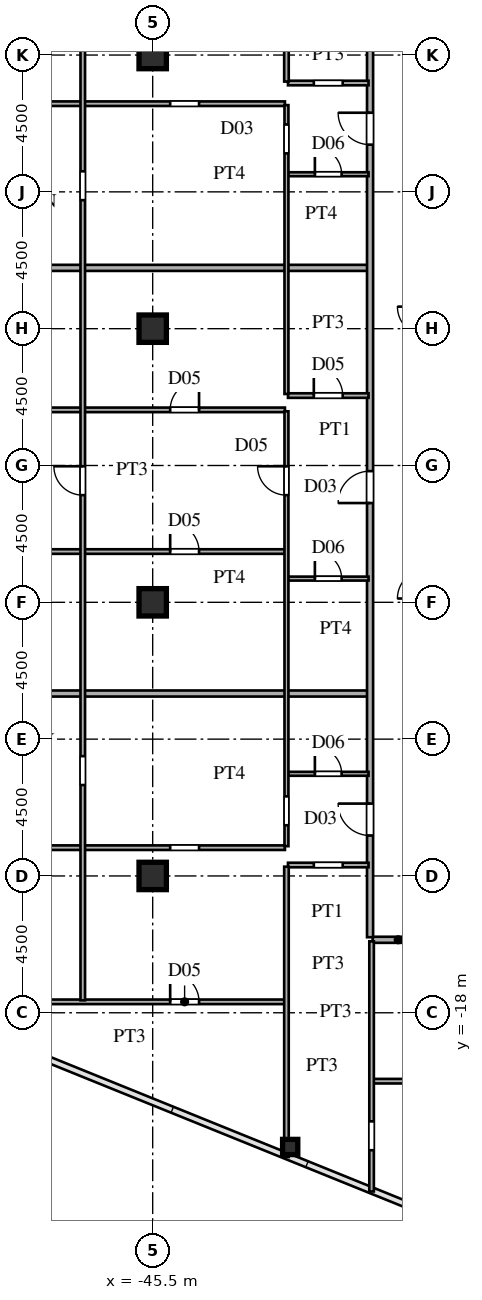
"""IFC4 building model, lengths in metres.
Left out: names, types, materials, properties, quantities, classifications, styles, units other than length and angle.
Written with IfcOpenShell. Run it as: python <this file> out.ifc"""

import sys

from ifc_helpers import new_model, si_unit, direction, frame, frame_2d, origin, origin_2d, place, context, subcontext, project, spatial, rectangle, hollow_rectangle, i_section, extrude, source, transform, mapped, element, fill, save


model = new_model("IFC4")
c1 = context("Model", 3, precision=1e-05, world=origin(), true_north=direction((0.0, 1.0)))
c2 = subcontext(c1, "Body", "Model", "MODEL_VIEW")
j1 = project(units=[si_unit("LENGTHUNIT", "METRE"), si_unit("PLANEANGLEUNIT", "RADIAN")], contexts=[c1])
p1 = place(None, origin())
s1 = spatial("IfcSite", under=j1, at=p1, CompositionType="ELEMENT")
p2 = place(p1, origin())
s2 = spatial("IfcBuilding", under=s1, at=p2, CompositionType="ELEMENT")
p3 = place(p2, frame((0.0, 0.0, 22.5)))
s3 = spatial("IfcBuildingStorey", under=s2, at=p3, CompositionType="ELEMENT", Elevation=22.5)
m1 = source(origin(), c2, "Body", "SweptSolid", [
    extrude(i_section(OverallWidth=0.9, OverallDepth=0.9, WebThickness=0.036, FlangeThickness=0.055, at=origin_2d()), origin(), (0.0, 0.0, 1.0), 3.6),
])
for number, where, z_axis, x_axis in (
    (1, (-45.5, -13.5, 0.0), (0.0, 0.0, 1.0), (1.0, 0.0, 0.0)),
    (2, (-45.5, -4.5, 0.0), (0.0, 0.0, 1.0), (1.0, 0.0, 0.0)),
    (3, (-45.5, 4.5, 0.0), (0.0, 0.0, 1.0), (1.0, 0.0, 0.0)),
    (4, (-45.5, 13.5, 0.0), (0.0, 0.0, 1.0), (1.0, 0.0, 0.0)),
):
    element("IfcColumn", number, at=place(p3, frame(where, z_axis=z_axis, x_axis=x_axis)), inside=s3, PredefinedType="COLUMN", context=c2, shape_type="MappedRepresentation", body=[
        mapped(m1, transform((0.0, 0.0, 0.0), scale=1.0)),
    ])
m2 = source(origin(), c2, "Body", "SweptSolid", [
    extrude(hollow_rectangle(XDim=0.5, YDim=0.5, WallThickness=0.02, at=origin_2d()), origin(), (0.0, 0.0, 1.0), 3.6),
])
p4 = place(p3, frame((-40.977, -22.414, 0.0), z_axis=(0.0, 0.0, 1.0), x_axis=(1.0, 0.0, 0.0)))
e5 = element("IfcColumn", 5, at=p4, inside=s3, PredefinedType="COLUMN", context=c2, shape_type="MappedRepresentation", body=[
    mapped(m2, transform((0.0, 0.0, 0.0), scale=1.0)),
])
p5 = place(p3, frame((-38.25, -20.25, 0.0), z_axis=(0.0, 0.0, 1.0), x_axis=(1.0, 0.0, 0.0)))
e6 = element("IfcWall", 6, at=p5, inside=s3, PredefinedType="PARTITIONING", context=c2, shape_type="SweptSolid", body=[
    extrude(rectangle(XDim=10.785, YDim=0.15, at=frame_2d((5.393, 0.0))), origin(), (0.0, 0.0, 1.0), 3.38),
])
p6 = place(p5, frame((4.875, 0.0, 0.0)))
e7 = element("IfcOpeningElement", 7, at=p6, cuts=e6, PredefinedType="OPENING", context=c2, shape_type="SweptSolid", body=[
    extrude(rectangle(XDim=0.95, YDim=2.15, at=frame_2d((0.475, 1.075))), frame((0.0, 0.085, 0.0), z_axis=(0.0, -1.0, 0.0), x_axis=(1.0, 0.0, 0.0)), (0.0, 0.0, 1.0), 0.17),
])
p7 = place(p3, frame((-53.66, -17.64, 0.0), z_axis=(0.0, 0.0, 1.0), x_axis=(1.0, 0.0, 0.0)))
e8 = element("IfcWall", 8, at=p7, inside=s3, PredefinedType="PARTITIONING", context=c2, shape_type="SweptSolid", body=[
    extrude(rectangle(XDim=12.51, YDim=0.15, at=frame_2d((6.255, 0.0))), origin(), (0.0, 0.0, 1.0), 3.38),
])
p8 = place(p7, frame((8.735, 0.0, 0.0)))
e9 = element("IfcOpeningElement", 9, at=p8, cuts=e8, PredefinedType="OPENING", context=c2, shape_type="SweptSolid", body=[
    extrude(rectangle(XDim=0.95, YDim=2.15, at=frame_2d((0.475, 1.075))), frame((0.0, 0.085, 0.0), z_axis=(0.0, -1.0, 0.0), x_axis=(1.0, 0.0, 0.0)), (0.0, 0.0, 1.0), 0.17),
])
p9 = place(p7, frame((2.659, 0.0, 0.0)))
e10 = element("IfcOpeningElement", 10, at=p9, cuts=e8, PredefinedType="OPENING", context=c2, shape_type="SweptSolid", body=[
    extrude(rectangle(XDim=0.95, YDim=2.15, at=frame_2d((0.475, 1.075))), frame((0.0, 0.085, 0.0), z_axis=(0.0, -1.0, 0.0), x_axis=(1.0, 0.0, 0.0)), (0.0, 0.0, 1.0), 0.17),
])
p10 = place(p3, frame((-38.265, -15.6, 0.0), z_axis=(0.0, 0.0, 1.0), x_axis=(1.0, 0.0, 0.0)))
e11 = element("IfcWall", 11, at=p10, inside=s3, PredefinedType="PARTITIONING", context=c2, shape_type="SweptSolid", body=[
    extrude(rectangle(XDim=1.68, YDim=0.2, at=frame_2d((0.84, 0.0))), origin(), (0.0, 0.0, 1.0), 3.38),
])
p11 = place(p3, frame((-41.05, -13.14, 0.0), z_axis=(0.0, 0.0, 1.0), x_axis=(1.0, 0.0, 0.0)))
e12 = element("IfcWall", 12, at=p11, inside=s3, PredefinedType="PARTITIONING", context=c2, shape_type="SweptSolid", body=[
    extrude(rectangle(XDim=2.65, YDim=0.15, at=frame_2d((1.325, 0.0))), origin(), (0.0, 0.0, 1.0), 3.38),
])
p12 = place(p11, frame((0.85, 0.0, 0.0)))
e13 = element("IfcOpeningElement", 13, at=p12, cuts=e12, PredefinedType="OPENING", context=c2, shape_type="SweptSolid", body=[
    extrude(rectangle(XDim=0.95, YDim=2.15, at=frame_2d((0.475, 1.075))), frame((0.0, 0.085, 0.0), z_axis=(0.0, -1.0, 0.0), x_axis=(1.0, 0.0, 0.0)), (0.0, 0.0, 1.0), 0.17),
])
p13 = place(p3, frame((-66.186, -12.57, 0.0), z_axis=(0.0, 0.0, 1.0), x_axis=(1.0, 0.0, 0.0)))
e14 = element("IfcWall", 14, at=p13, inside=s3, PredefinedType="PARTITIONING", context=c2, shape_type="SweptSolid", body=[
    extrude(rectangle(XDim=25.036, YDim=0.15, at=frame_2d((12.518, 0.0))), origin(), (0.0, 0.0, 1.0), 3.38),
])
p14 = place(p13, frame((21.261, 0.0, 0.0)))
e15 = element("IfcOpeningElement", 15, at=p14, cuts=e14, PredefinedType="OPENING", context=c2, shape_type="SweptSolid", body=[
    extrude(rectangle(XDim=0.95, YDim=2.15, at=frame_2d((0.475, 1.075))), frame((0.0, 0.085, 0.0), z_axis=(0.0, -1.0, 0.0), x_axis=(1.0, 0.0, 0.0)), (0.0, 0.0, 1.0), 0.17),
])
p15 = place(p13, frame((8.361, 0.0, 0.0)))
e16 = element("IfcOpeningElement", 16, at=p15, cuts=e14, PredefinedType="OPENING", context=c2, shape_type="SweptSolid", body=[
    extrude(rectangle(XDim=0.95, YDim=2.15, at=frame_2d((0.475, 1.075))), frame((0.0, 0.085, 0.0), z_axis=(0.0, -1.0, 0.0), x_axis=(1.0, 0.0, 0.0)), (0.0, 0.0, 1.0), 0.17),
])
p16 = place(p3, frame((-41.05, -10.14, 0.0), z_axis=(0.0, 0.0, 1.0), x_axis=(1.0, 0.0, 0.0)))
e17 = element("IfcWall", 17, at=p16, inside=s3, PredefinedType="PARTITIONING", context=c2, shape_type="SweptSolid", body=[
    extrude(rectangle(XDim=2.65, YDim=0.13, at=frame_2d((1.325, 0.0))), origin(), (0.0, 0.0, 1.0), 3.38),
])
p17 = place(p16, frame((0.885, 0.0, 0.0)))
e18 = element("IfcOpeningElement", 18, at=p17, cuts=e17, PredefinedType="OPENING", context=c2, shape_type="SweptSolid", body=[
    extrude(rectangle(XDim=0.88, YDim=2.1, at=frame_2d((0.44, 1.05))), frame((0.0, 0.075, 0.0), z_axis=(0.0, -1.0, 0.0), x_axis=(1.0, 0.0, 0.0)), (0.0, 0.0, 1.0), 0.15),
])
p18 = place(p3, frame((-72.505, -7.5, 0.0), z_axis=(0.0, 0.0, 1.0), x_axis=(1.0, 0.0, 0.0)))
e19 = element("IfcWall", 19, at=p18, inside=s3, PredefinedType="PARTITIONING", context=c2, shape_type="SweptSolid", body=[
    extrude(rectangle(XDim=34.075, YDim=0.2, at=frame_2d((17.038, 0.0))), origin(), (0.0, 0.0, 1.0), 3.38),
])
p19 = place(p3, frame((-41.05, -3.72, 0.0), z_axis=(0.0, 0.0, 1.0), x_axis=(1.0, 0.0, 0.0)))
e20 = element("IfcWall", 20, at=p19, inside=s3, PredefinedType="PARTITIONING", context=c2, shape_type="SweptSolid", body=[
    extrude(rectangle(XDim=2.65, YDim=0.13, at=frame_2d((1.325, 0.0))), origin(), (0.0, 0.0, 1.0), 3.38),
])
p20 = place(p19, frame((0.885, 0.0, 0.0)))
e21 = element("IfcOpeningElement", 21, at=p20, cuts=e20, PredefinedType="OPENING", context=c2, shape_type="SweptSolid", body=[
    extrude(rectangle(XDim=0.88, YDim=2.1, at=frame_2d((0.44, 1.05))), frame((0.0, 0.075, 0.0), z_axis=(0.0, -1.0, 0.0), x_axis=(1.0, 0.0, 0.0)), (0.0, 0.0, 1.0), 0.15),
])
p21 = place(p3, frame((-72.535, -2.83, 0.0), z_axis=(0.0, 0.0, 1.0), x_axis=(1.0, 0.0, 0.0)))
e22 = element("IfcWall", 22, at=p21, inside=s3, PredefinedType="PARTITIONING", context=c2, shape_type="SweptSolid", body=[
    extrude(rectangle(XDim=31.385, YDim=0.15, at=frame_2d((15.692, 0.0))), origin(), (0.0, 0.0, 1.0), 3.38),
])
p22 = place(p21, frame((27.61, 0.0, 0.0)))
e23 = element("IfcOpeningElement", 23, at=p22, cuts=e22, PredefinedType="OPENING", context=c2, shape_type="SweptSolid", body=[
    extrude(rectangle(XDim=0.95, YDim=2.15, at=frame_2d((0.475, 1.075))), frame((0.0, 0.085, 0.0), z_axis=(0.0, -1.0, 0.0), x_axis=(1.0, 0.0, 0.0)), (0.0, 0.0, 1.0), 0.17),
])
p23 = place(p21, frame((14.71, 0.0, 0.0)))
e24 = element("IfcOpeningElement", 24, at=p23, cuts=e22, PredefinedType="OPENING", context=c2, shape_type="SweptSolid", body=[
    extrude(rectangle(XDim=0.95, YDim=2.15, at=frame_2d((0.475, 1.075))), frame((0.0, 0.085, 0.0), z_axis=(0.0, -1.0, 0.0), x_axis=(1.0, 0.0, 0.0)), (0.0, 0.0, 1.0), 0.17),
])
p24 = place(p3, frame((-72.535, 1.83, 0.0), z_axis=(0.0, 0.0, 1.0), x_axis=(1.0, 0.0, 0.0)))
e25 = element("IfcWall", 25, at=p24, inside=s3, PredefinedType="PARTITIONING", context=c2, shape_type="SweptSolid", body=[
    extrude(rectangle(XDim=31.385, YDim=0.15, at=frame_2d((15.692, 0.0))), origin(), (0.0, 0.0, 1.0), 3.38),
])
p25 = place(p24, frame((27.61, 0.0, 0.0)))
e26 = element("IfcOpeningElement", 26, at=p25, cuts=e25, PredefinedType="OPENING", context=c2, shape_type="SweptSolid", body=[
    extrude(rectangle(XDim=0.95, YDim=2.15, at=frame_2d((0.475, 1.075))), frame((0.0, 0.085, 0.0), z_axis=(0.0, -1.0, 0.0), x_axis=(1.0, 0.0, 0.0)), (0.0, 0.0, 1.0), 0.17),
])
p26 = place(p24, frame((14.71, 0.0, 0.0)))
e27 = element("IfcOpeningElement", 27, at=p26, cuts=e25, PredefinedType="OPENING", context=c2, shape_type="SweptSolid", body=[
    extrude(rectangle(XDim=0.95, YDim=2.15, at=frame_2d((0.475, 1.075))), frame((0.0, 0.085, 0.0), z_axis=(0.0, -1.0, 0.0), x_axis=(1.0, 0.0, 0.0)), (0.0, 0.0, 1.0), 0.17),
])
p27 = place(p3, frame((-41.05, 2.3, 0.0), z_axis=(0.0, 0.0, 1.0), x_axis=(1.0, 0.0, 0.0)))
e28 = element("IfcWall", 28, at=p27, inside=s3, PredefinedType="PARTITIONING", context=c2, shape_type="SweptSolid", body=[
    extrude(rectangle(XDim=2.65, YDim=0.15, at=frame_2d((1.325, 0.0))), origin(), (0.0, 0.0, 1.0), 3.38),
])
p28 = place(p27, frame((0.85, 0.0, 0.0)))
e29 = element("IfcOpeningElement", 29, at=p28, cuts=e28, PredefinedType="OPENING", context=c2, shape_type="SweptSolid", body=[
    extrude(rectangle(XDim=0.95, YDim=2.15, at=frame_2d((0.475, 1.075))), frame((0.0, 0.085, 0.0), z_axis=(0.0, -1.0, 0.0), x_axis=(1.0, 0.0, 0.0)), (0.0, 0.0, 1.0), 0.17),
])
p29 = place(p3, frame((-72.505, 6.5, 0.0), z_axis=(0.0, 0.0, 1.0), x_axis=(1.0, 0.0, 0.0)))
e30 = element("IfcWall", 30, at=p29, inside=s3, PredefinedType="PARTITIONING", context=c2, shape_type="SweptSolid", body=[
    extrude(rectangle(XDim=34.075, YDim=0.2, at=frame_2d((17.038, 0.0))), origin(), (0.0, 0.0, 1.0), 3.38),
])
p30 = place(p3, frame((-41.05, 9.58, 0.0), z_axis=(0.0, 0.0, 1.0), x_axis=(1.0, 0.0, 0.0)))
e31 = element("IfcWall", 31, at=p30, inside=s3, PredefinedType="PARTITIONING", context=c2, shape_type="SweptSolid", body=[
    extrude(rectangle(XDim=2.65, YDim=0.13, at=frame_2d((1.325, 0.0))), origin(), (0.0, 0.0, 1.0), 3.38),
])
p31 = place(p30, frame((0.885, 0.0, 0.0)))
e32 = element("IfcOpeningElement", 32, at=p31, cuts=e31, PredefinedType="OPENING", context=c2, shape_type="SweptSolid", body=[
    extrude(rectangle(XDim=0.88, YDim=2.1, at=frame_2d((0.44, 1.05))), frame((0.0, 0.075, 0.0), z_axis=(0.0, -1.0, 0.0), x_axis=(1.0, 0.0, 0.0)), (0.0, 0.0, 1.0), 0.15),
])
p32 = place(p3, frame((-67.833, 11.9, 0.0), z_axis=(0.0, 0.0, 1.0), x_axis=(1.0, 0.0, 0.0)))
e33 = element("IfcWall", 33, at=p32, inside=s3, PredefinedType="PARTITIONING", context=c2, shape_type="SweptSolid", body=[
    extrude(rectangle(XDim=26.683, YDim=0.15, at=frame_2d((13.342, 0.0))), origin(), (0.0, 0.0, 1.0), 3.38),
])
p33 = place(p32, frame((22.908, 0.0, 0.0)))
e34 = element("IfcOpeningElement", 34, at=p33, cuts=e33, PredefinedType="OPENING", context=c2, shape_type="SweptSolid", body=[
    extrude(rectangle(XDim=0.95, YDim=2.15, at=frame_2d((0.475, 1.075))), frame((0.0, 0.085, 0.0), z_axis=(0.0, -1.0, 0.0), x_axis=(1.0, 0.0, 0.0)), (0.0, 0.0, 1.0), 0.17),
])
p34 = place(p32, frame((3.359, 0.0, 0.0)))
e35 = element("IfcOpeningElement", 35, at=p34, cuts=e33, PredefinedType="OPENING", context=c2, shape_type="SweptSolid", body=[
    extrude(rectangle(XDim=0.95, YDim=2.15, at=frame_2d((0.475, 1.075))), frame((0.0, 0.085, 0.0), z_axis=(0.0, -1.0, 0.0), x_axis=(1.0, 0.0, 0.0)), (0.0, 0.0, 1.0), 0.17),
])
p35 = place(p32, frame((16.208, 0.0, 0.0)))
e36 = element("IfcOpeningElement", 36, at=p35, cuts=e33, PredefinedType="OPENING", context=c2, shape_type="SweptSolid", body=[
    extrude(rectangle(XDim=0.95, YDim=2.15, at=frame_2d((0.475, 1.075))), frame((0.0, 0.085, 0.0), z_axis=(0.0, -1.0, 0.0), x_axis=(1.0, 0.0, 0.0)), (0.0, 0.0, 1.0), 0.17),
])
p36 = place(p3, frame((-41.05, 12.58, 0.0), z_axis=(0.0, 0.0, 1.0), x_axis=(1.0, 0.0, 0.0)))
e37 = element("IfcWall", 37, at=p36, inside=s3, PredefinedType="PARTITIONING", context=c2, shape_type="SweptSolid", body=[
    extrude(rectangle(XDim=2.65, YDim=0.15, at=frame_2d((1.325, 0.0))), origin(), (0.0, 0.0, 1.0), 3.38),
])
p37 = place(p36, frame((0.85, 0.0, 0.0)))
e38 = element("IfcOpeningElement", 38, at=p37, cuts=e37, PredefinedType="OPENING", context=c2, shape_type="SweptSolid", body=[
    extrude(rectangle(XDim=0.95, YDim=2.15, at=frame_2d((0.475, 1.075))), frame((0.0, 0.085, 0.0), z_axis=(0.0, -1.0, 0.0), x_axis=(1.0, 0.0, 0.0)), (0.0, 0.0, 1.0), 0.17),
])
p38 = place(p3, frame((-47.8, -17.59, 0.0), z_axis=(0.0, 0.0, 1.0), x_axis=(0.0, 1.0, 0.0)))
e39 = element("IfcWall", 39, at=p38, inside=s3, PredefinedType="PARTITIONING", context=c2, shape_type="SweptSolid", body=[
    extrude(rectangle(XDim=34.846, YDim=0.15, at=frame_2d((17.423, 0.0))), origin(), (0.0, 0.0, 1.0), 3.38),
])
p39 = place(p38, frame((7.08, 0.0, 0.0)))
e40 = element("IfcOpeningElement", 40, at=p39, cuts=e39, PredefinedType="OPENING", context=c2, shape_type="SweptSolid", body=[
    extrude(rectangle(XDim=0.95, YDim=2.15, at=frame_2d((0.475, 1.075))), frame((0.0, 0.085, 0.0), z_axis=(0.0, -1.0, 0.0), x_axis=(1.0, 0.0, 0.0)), (0.0, 0.0, 1.0), 0.17),
])
p40 = place(p38, frame((16.615, 0.0, 0.0)))
e41 = element("IfcOpeningElement", 41, at=p40, cuts=e39, PredefinedType="OPENING", context=c2, shape_type="SweptSolid", body=[
    extrude(rectangle(XDim=0.95, YDim=2.15, at=frame_2d((0.475, 1.075))), frame((0.0, 0.085, 0.0), z_axis=(0.0, -1.0, 0.0), x_axis=(1.0, 0.0, 0.0)), (0.0, 0.0, 1.0), 0.17),
])
p41 = place(p38, frame((26.317, 0.0, 0.0)))
e42 = element("IfcOpeningElement", 42, at=p41, cuts=e39, PredefinedType="OPENING", context=c2, shape_type="SweptSolid", body=[
    extrude(rectangle(XDim=0.95, YDim=2.15, at=frame_2d((0.475, 1.075))), frame((0.0, 0.085, 0.0), z_axis=(0.0, -1.0, 0.0), x_axis=(1.0, 0.0, 0.0)), (0.0, 0.0, 1.0), 0.17),
])
p42 = place(p3, frame((-41.1, -22.744, 0.0), z_axis=(0.0, 0.0, 1.0), x_axis=(0.0, 1.0, 0.0)))
e43 = element("IfcWall", 43, at=p42, inside=s3, PredefinedType="PARTITIONING", context=c2, shape_type="SweptSolid", body=[
    extrude(rectangle(XDim=9.549, YDim=0.15, at=frame_2d((4.774, 0.0))), origin(), (0.0, 0.0, 1.0), 3.38),
])
p43 = place(p3, frame((-41.1, -12.52, 0.0), z_axis=(0.0, 0.0, 1.0), x_axis=(0.0, 1.0, 0.0)))
e44 = element("IfcWall", 44, at=p43, inside=s3, PredefinedType="PARTITIONING", context=c2, shape_type="SweptSolid", body=[
    extrude(rectangle(XDim=14.303, YDim=0.13, at=frame_2d((7.151, 0.0))), origin(), (0.0, 0.0, 1.0), 3.38),
])
p44 = place(p43, frame((0.688, 0.0, 0.0)))
e45 = element("IfcOpeningElement", 45, at=p44, cuts=e44, PredefinedType="OPENING", context=c2, shape_type="SweptSolid", body=[
    extrude(rectangle(XDim=0.95, YDim=2.15, at=frame_2d((0.475, 1.075))), frame((0.0, 0.075, 0.0), z_axis=(0.0, -1.0, 0.0), x_axis=(1.0, 0.0, 0.0)), (0.0, 0.0, 1.0), 0.15),
])
p45 = place(p43, frame((11.545, 0.0, 0.0)))
e46 = element("IfcOpeningElement", 46, at=p45, cuts=e44, PredefinedType="OPENING", context=c2, shape_type="SweptSolid", body=[
    extrude(rectangle(XDim=0.95, YDim=2.15, at=frame_2d((0.475, 1.075))), frame((0.0, 0.075, 0.0), z_axis=(0.0, -1.0, 0.0), x_axis=(1.0, 0.0, 0.0)), (0.0, 0.0, 1.0), 0.15),
])
p46 = place(p3, frame((-41.1, 2.352, 0.0), z_axis=(0.0, 0.0, 1.0), x_axis=(0.0, 1.0, 0.0)))
e47 = element("IfcWall", 47, at=p46, inside=s3, PredefinedType="PARTITIONING", context=c2, shape_type="SweptSolid", body=[
    extrude(rectangle(XDim=9.501, YDim=0.13, at=frame_2d((4.75, 0.0))), origin(), (0.0, 0.0, 1.0), 3.38),
])
p47 = place(p46, frame((7.913, 0.0, 0.0)))
e48 = element("IfcOpeningElement", 48, at=p47, cuts=e47, PredefinedType="OPENING", context=c2, shape_type="SweptSolid", body=[
    extrude(rectangle(XDim=0.95, YDim=2.15, at=frame_2d((0.475, 1.075))), frame((0.0, 0.075, 0.0), z_axis=(0.0, -1.0, 0.0), x_axis=(1.0, 0.0, 0.0)), (0.0, 0.0, 1.0), 0.15),
])
p48 = place(p3, frame((-41.1, 12.628, 0.0), z_axis=(0.0, 0.0, 1.0), x_axis=(0.0, 1.0, 0.0)))
e49 = element("IfcWall", 49, at=p48, inside=s3, PredefinedType="PARTITIONING", context=c2, shape_type="SweptSolid", body=[
    extrude(rectangle(XDim=10.116, YDim=0.15, at=frame_2d((5.058, 0.0))), origin(), (0.0, 0.0, 1.0), 2.99),
])
p49 = place(p3, frame((-38.35, -15.515, 0.0), z_axis=(0.0, 0.0, 1.0), x_axis=(0.0, 1.0, 0.0)))
e50 = element("IfcWall", 50, at=p49, inside=s3, PredefinedType="PARTITIONING", context=c2, shape_type="SweptSolid", body=[
    extrude(rectangle(XDim=31.03, YDim=0.2, at=frame_2d((15.515, 0.0))), origin(), (0.0, 0.0, 1.0), 3.38),
])
p50 = place(p49, frame((3.345, 0.0, 0.0)))
e51 = element("IfcOpeningElement", 51, at=p50, cuts=e50, PredefinedType="OPENING", context=c2, shape_type="SweptSolid", body=[
    extrude(rectangle(XDim=1.05, YDim=2.25, at=frame_2d((0.525, 1.125))), frame((0.0, 0.11, 0.0), z_axis=(0.0, -1.0, 0.0), x_axis=(1.0, 0.0, 0.0)), (0.0, 0.0, 1.0), 0.22),
])
p51 = place(p49, frame((14.28, 0.0, 0.0)))
e52 = element("IfcOpeningElement", 52, at=p51, cuts=e50, PredefinedType="OPENING", context=c2, shape_type="SweptSolid", body=[
    extrude(rectangle(XDim=1.05, YDim=2.25, at=frame_2d((0.525, 1.125))), frame((0.0, 0.11, 0.0), z_axis=(0.0, -1.0, 0.0), x_axis=(1.0, 0.0, 0.0)), (0.0, 0.0, 1.0), 0.22),
])
p52 = place(p49, frame((26.067, 0.0, 0.0)))
e53 = element("IfcOpeningElement", 53, at=p52, cuts=e50, PredefinedType="OPENING", context=c2, shape_type="SweptSolid", body=[
    extrude(rectangle(XDim=1.05, YDim=2.25, at=frame_2d((0.525, 1.125))), frame((0.0, 0.11, 0.0), z_axis=(0.0, -1.0, 0.0), x_axis=(1.0, 0.0, 0.0)), (0.0, 0.0, 1.0), 0.22),
])
p53 = place(p3, frame((-38.3, -23.878, 0.0), z_axis=(0.0, 0.0, 1.0), x_axis=(0.0, 1.0, 0.0)))
e54 = element("IfcWall", 54, at=p53, inside=s3, PredefinedType="PARTITIONING", context=c2, shape_type="SweptSolid", body=[
    extrude(rectangle(XDim=8.228, YDim=0.15, at=frame_2d((4.114, 0.0))), origin(), (0.0, 0.0, 1.0), 3.38),
])
p54 = place(p53, frame((1.357, 0.0, 0.0)))
e55 = element("IfcOpeningElement", 55, at=p54, cuts=e54, PredefinedType="OPENING", context=c2, shape_type="SweptSolid", body=[
    extrude(rectangle(XDim=0.95, YDim=2.15, at=frame_2d((0.475, 1.075))), frame((0.0, 0.085, 0.0), z_axis=(0.0, -1.0, 0.0), x_axis=(1.0, 0.0, 0.0)), (0.0, 0.0, 1.0), 0.17),
])
m3 = source(origin(), c2, "Body", "SweptSolid", [
    extrude(rectangle(XDim=0.95, YDim=2.15, at=frame_2d((0.475, 1.075))), frame((0.0, 0.025, 0.0), z_axis=(0.0, -1.0, 0.0), x_axis=(1.0, 0.0, 0.0)), (0.0, 0.0, 1.0), 0.05),
])
p55 = place(p8, origin())
e56 = element("IfcDoor", 56, at=p55, inside=s3, OperationType="SINGLE_SWING_LEFT", PredefinedType="DOOR", context=c2, shape_type="MappedRepresentation", body=[
    mapped(m3, transform((0.0, 0.0, 0.0), scale=1.0)),
])
fill(e9, e56)
m4 = source(origin(), c2, "Body", "SweptSolid", [
    extrude(rectangle(XDim=0.88, YDim=2.1, at=frame_2d((0.44, 1.05))), frame((0.0, 0.025, 0.0), z_axis=(0.0, -1.0, 0.0), x_axis=(1.0, 0.0, 0.0)), (0.0, 0.0, 1.0), 0.05),
])
p56 = place(p17, origin())
e57 = element("IfcDoor", 57, at=p56, inside=s3, OperationType="SINGLE_SWING_LEFT", PredefinedType="DOOR", context=c2, shape_type="MappedRepresentation", body=[
    mapped(m4, transform((0.0, 0.0, 0.0), scale=1.0)),
])
fill(e18, e57)
p57 = place(p20, origin())
e58 = element("IfcDoor", 58, at=p57, inside=s3, OperationType="SINGLE_SWING_LEFT", PredefinedType="DOOR", context=c2, shape_type="MappedRepresentation", body=[
    mapped(m4, transform((0.0, 0.0, 0.0), scale=1.0)),
])
fill(e21, e58)
p58 = place(p22, origin())
e59 = element("IfcDoor", 59, at=p58, inside=s3, OperationType="SINGLE_SWING_LEFT", PredefinedType="DOOR", context=c2, shape_type="MappedRepresentation", body=[
    mapped(m3, transform((0.0, 0.0, 0.0), scale=1.0)),
])
fill(e23, e59)
p59 = place(p25, origin())
e60 = element("IfcDoor", 60, at=p59, inside=s3, OperationType="SINGLE_SWING_RIGHT", PredefinedType="DOOR", context=c2, shape_type="MappedRepresentation", body=[
    mapped(m3, transform((0.0, 0.0, 0.0), scale=1.0)),
])
fill(e26, e60)
p60 = place(p28, origin())
e61 = element("IfcDoor", 61, at=p60, inside=s3, OperationType="SINGLE_SWING_LEFT", PredefinedType="DOOR", context=c2, shape_type="MappedRepresentation", body=[
    mapped(m3, transform((0.0, 0.0, 0.0), scale=1.0)),
])
fill(e29, e61)
p61 = place(p31, origin())
e62 = element("IfcDoor", 62, at=p61, inside=s3, OperationType="SINGLE_SWING_LEFT", PredefinedType="DOOR", context=c2, shape_type="MappedRepresentation", body=[
    mapped(m4, transform((0.0, 0.0, 0.0), scale=1.0)),
])
fill(e32, e62)
p62 = place(p40, origin())
e63 = element("IfcDoor", 63, at=p62, inside=s3, OperationType="SINGLE_SWING_RIGHT", PredefinedType="DOOR", context=c2, shape_type="MappedRepresentation", body=[
    mapped(m3, transform((0.0, 0.0, 0.0), scale=1.0)),
])
fill(e41, e63)
p63 = place(p45, origin())
e64 = element("IfcDoor", 64, at=p63, inside=s3, OperationType="SINGLE_SWING_RIGHT", PredefinedType="DOOR", context=c2, shape_type="MappedRepresentation", body=[
    mapped(m3, transform((0.0, 0.0, 0.0), scale=1.0)),
])
fill(e46, e64)
m5 = source(origin(), c2, "Body", "SweptSolid", [
    extrude(rectangle(XDim=1.05, YDim=2.25, at=frame_2d((0.525, 1.125))), frame((0.0, 0.025, 0.0), z_axis=(0.0, -1.0, 0.0), x_axis=(1.0, 0.0, 0.0)), (0.0, 0.0, 1.0), 0.05),
])
p64 = place(p50, origin())
e65 = element("IfcDoor", 65, at=p64, inside=s3, OperationType="SINGLE_SWING_RIGHT", PredefinedType="DOOR", context=c2, shape_type="MappedRepresentation", body=[
    mapped(m5, transform((0.0, 0.0, 0.0), scale=1.0)),
])
fill(e51, e65)
p65 = place(p51, origin())
e66 = element("IfcDoor", 66, at=p65, inside=s3, OperationType="SINGLE_SWING_LEFT", PredefinedType="DOOR", context=c2, shape_type="MappedRepresentation", body=[
    mapped(m5, transform((0.0, 0.0, 0.0), scale=1.0)),
])
fill(e52, e66)
p66 = place(p52, origin())
e67 = element("IfcDoor", 67, at=p66, inside=s3, OperationType="SINGLE_SWING_RIGHT", PredefinedType="DOOR", context=c2, shape_type="MappedRepresentation", body=[
    mapped(m5, transform((0.0, 0.0, 0.0), scale=1.0)),
])
fill(e53, e67)
save(model, sys.argv[1])
